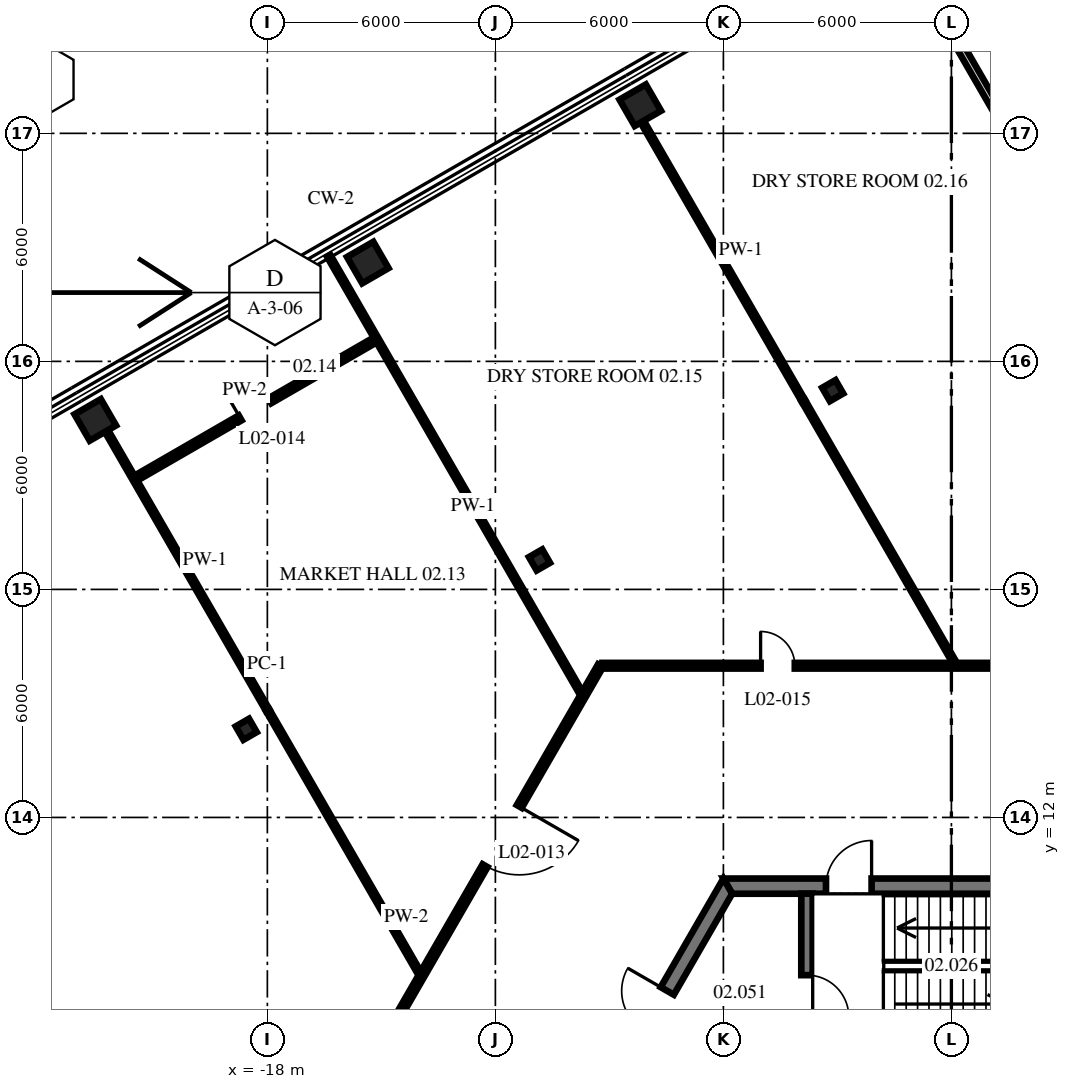
"""IFC4 building model, lengths in metres.
Left out: names, types, materials, properties, quantities, classifications, styles, units other than length and angle.
Written with IfcOpenShell. Run it as: python <this file> out.ifc"""

import sys

from ifc_helpers import new_model, si_unit, direction, frame, frame_2d, origin, origin_2d, place, context, subcontext, project, spatial, polyline, rectangle, i_section, outline, extrude, source, transform, mapped, element, fill, save


model = new_model("IFC4")
c1 = context("Model", 3, precision=1e-05, world=origin(), true_north=direction((0.0, 1.0)))
c2 = subcontext(c1, "Body", "Model", "MODEL_VIEW")
j1 = project(units=[si_unit("LENGTHUNIT", "METRE"), si_unit("PLANEANGLEUNIT", "RADIAN")], contexts=[c1])
p1 = place(None, origin())
s1 = spatial("IfcSite", under=j1, at=p1, CompositionType="ELEMENT")
p2 = place(p1, origin())
s2 = spatial("IfcBuilding", under=s1, at=p2, CompositionType="ELEMENT")
p3 = place(p2, frame((0.0, 0.0, 11.5)))
s3 = spatial("IfcBuildingStorey", under=s2, at=p3, CompositionType="ELEMENT", Elevation=11.5)
m1 = source(origin(), c2, "Body", "SweptSolid", [
    extrude(i_section(OverallWidth=0.404, OverallDepth=0.406, WebThickness=0.027, FlangeThickness=0.044, at=origin_2d()), origin(), (0.0, 0.0, 1.0), 4.5),
])
for number, where, z_axis, x_axis in (
    (1, (-3.124, 23.23, 0.0), (0.0, 0.0, 1.0), (-0.866, -0.5, 0.0)),
    (2, (-10.84, 18.775, 0.0), (0.0, 0.0, 1.0), (-0.866, -0.5, 0.0)),
    (3, (-18.556, 14.32, 0.0), (0.0, 0.0, 1.0), (-0.866, -0.5, 0.0)),
):
    element("IfcColumn", number, at=place(p3, frame(where, z_axis=z_axis, x_axis=x_axis)), inside=s3, PredefinedType="COLUMN", context=c2, shape_type="MappedRepresentation", body=[
        mapped(m1, transform((0.0, 0.0, 0.0), scale=1.0)),
    ])
m2 = source(origin(), c2, "Body", "SweptSolid", [
    extrude(rectangle(XDim=0.8, YDim=0.8, at=origin_2d()), origin(), (0.0, 0.0, 1.0), 4.5),
])
for number, where, z_axis, x_axis in (
    (4, (-8.187, 30.74, 0.0), (0.0, 0.0, 1.0), (-0.866, -0.5, 0.0)),
    (5, (-15.357, 26.6, 0.0), (0.0, 0.0, 1.0), (-0.866, -0.5, 0.0)),
    (6, (-22.528, 22.46, 0.0), (0.0, 0.0, 1.0), (-0.866, -0.5, 0.0)),
):
    element("IfcColumn", number, at=place(p3, frame(where, z_axis=z_axis, x_axis=x_axis)), inside=s3, PredefinedType="COLUMN", context=c2, shape_type="MappedRepresentation", body=[
        mapped(m2, transform((0.0, 0.0, 0.0), scale=1.0)),
    ])
m3 = source(origin(), c2, "Body", "SweptSolid", [
    extrude(outline(polyline([(-0.115, -0.2), (11.885, -0.2), (11.654, 0.2), (0.115, 0.2), (-0.115, -0.2)])), origin(), (0.0, 0.0, 1.0), 4.3),
])
p4 = place(p3, frame((5.885, 10.192, 0.0), z_axis=(0.0, 0.0, 1.0), x_axis=(-1.0, 0.0, 0.0)))
e7 = element("IfcWall", 7, at=p4, inside=s3, PredefinedType="SHEAR", context=c2, shape_type="MappedRepresentation", body=[
    mapped(m3, transform((0.0, 0.0, 0.0), scale=1.0)),
])
p5 = place(p4, frame((7.985, 0.0, 0.0)))
e8 = element("IfcOpeningElement", 8, at=p5, cuts=e7, PredefinedType="OPENING", context=c2, shape_type="SweptSolid", body=[
    extrude(rectangle(XDim=1.2, YDim=2.1, at=frame_2d((0.6, 1.05))), frame((0.0, 0.21, 0.0), z_axis=(0.0, -1.0, 0.0), x_axis=(1.0, 0.0, 0.0)), (0.0, 0.0, 1.0), 0.42),
])
p6 = place(p3, frame((-5.885, 10.192, 0.0), z_axis=(0.0, 0.0, 1.0), x_axis=(-0.499996592174, -0.866027371285, 0.0)))
e9 = element("IfcWall", 9, at=p6, inside=s3, PredefinedType="SHEAR", context=c2, shape_type="MappedRepresentation", body=[
    mapped(m3, transform((0.0, 0.0, 0.0), scale=1.0)),
])
p7 = place(p6, frame((3.185, 0.0, 0.0)))
e10 = element("IfcOpeningElement", 10, at=p7, cuts=e9, PredefinedType="OPENING", context=c2, shape_type="SweptSolid", body=[
    extrude(rectangle(XDim=1.2, YDim=2.1, at=frame_2d((0.6, 1.05))), frame((0.0, 0.21, 0.0), z_axis=(0.0, -1.0, 0.0), x_axis=(1.0, 0.0, 0.0)), (0.0, 0.0, 1.0), 0.42),
])
m4 = source(origin(), c2, "Body", "SweptSolid", [
    extrude(outline(polyline([(0.0, -0.15), (0.0, 0.15), (3.804, 0.15), (3.804, -0.15), (0.0, -0.15)])), origin(), (0.0, 0.0, 1.0), 4.3),
])
p8 = place(p3, frame((-3.8, 6.19, 0.0), z_axis=(0.0, 0.0, 1.0), x_axis=(0.0, 1.0, 0.0)))
e11 = element("IfcWall", 11, at=p8, inside=s3, PredefinedType="SHEAR", context=c2, shape_type="MappedRepresentation", body=[
    mapped(m4, transform((0.0, 0.0, 0.0), scale=1.0)),
])
p9 = place(p8, frame((0.56, 0.0, 0.0)))
e12 = element("IfcOpeningElement", 12, at=p9, cuts=e11, PredefinedType="OPENING", context=c2, shape_type="SweptSolid", body=[
    extrude(rectangle(XDim=1.1, YDim=2.1, at=frame_2d((0.55, 1.05))), frame((0.0, 0.16, 0.0), z_axis=(0.0, -1.0, 0.0), x_axis=(1.0, 0.0, 0.0)), (0.0, 0.0, 1.0), 0.32),
])
m5 = source(origin(), c2, "Body", "SweptSolid", [
    extrude(rectangle(XDim=8.493, YDim=0.1, at=frame_2d((4.247, 0.0))), origin(), (0.0, 0.0, 1.0), 3.528),
])
p10 = place(p3, frame((-22.238, 22.177, 0.0), z_axis=(0.0, 0.0, 1.0), x_axis=(0.500003631449, -0.866023307156, 0.0)))
e13 = element("IfcWall", 13, at=p10, inside=s3, PredefinedType="PARTITIONING", context=c2, shape_type="MappedRepresentation", body=[
    mapped(m5, transform((0.0, 0.0, 0.0), scale=1.0)),
])
m6 = source(origin(), c2, "Body", "SweptSolid", [
    extrude(rectangle(XDim=7.993, YDim=0.1, at=frame_2d((3.996, 0.0))), origin(), (0.0, 0.0, 1.0), 4.3),
])
p11 = place(p3, frame((-17.991, 14.822, 0.0), z_axis=(0.0, 0.0, 1.0), x_axis=(0.499999202028, -0.866025864493, 0.0)))
e14 = element("IfcWall", 14, at=p11, inside=s3, PredefinedType="PARTITIONING", context=c2, shape_type="MappedRepresentation", body=[
    mapped(m6, transform((0.0, 0.0, 0.0), scale=1.0)),
])
p12 = place(p3, frame((-16.384, 26.774, 0.0), z_axis=(0.0, 0.0, 1.0), x_axis=(0.499987033477, -0.86603288988, 0.0)))
e15 = element("IfcWall", 15, at=p12, inside=s3, PredefinedType="PARTITIONING", context=c2, shape_type="SweptSolid", body=[
    extrude(rectangle(XDim=13.286, YDim=0.1, at=frame_2d((6.643, 0.0))), origin(), (0.0, 0.0, 1.0), 4.3),
])
m7 = source(origin(), c2, "Body", "SweptSolid", [
    extrude(rectangle(XDim=8.493, YDim=0.1, at=frame_2d((4.247, 0.0))), origin(), (0.0, 0.0, 1.0), 3.528),
])
p13 = place(p3, frame((-8.141, 30.316, 0.0), z_axis=(0.0, 0.0, 1.0), x_axis=(0.499991184371, -0.86603049343, 0.0)))
e16 = element("IfcWall", 16, at=p13, inside=s3, PredefinedType="PARTITIONING", context=c2, shape_type="MappedRepresentation", body=[
    mapped(m7, transform((0.0, 0.0, 0.0), scale=1.0)),
])
p14 = place(p3, frame((-3.894, 22.961, 0.0), z_axis=(0.0, 0.0, 1.0), x_axis=(0.50001992892, -0.866013897511, 0.0)))
e17 = element("IfcWall", 17, at=p14, inside=s3, PredefinedType="PARTITIONING", context=c2, shape_type="SweptSolid", body=[
    extrude(rectangle(XDim=7.957, YDim=0.1, at=frame_2d((3.979, 0.0))), origin(), (0.0, 0.0, 1.0), 4.3),
])
p15 = place(p3, frame((-1.012, 34.432, 0.0), z_axis=(0.0, 0.0, 1.0), x_axis=(0.499992253202, -0.866029876354, 0.0)))
e18 = element("IfcWall", 18, at=p15, inside=s3, PredefinedType="PARTITIONING", context=c2, shape_type="SweptSolid", body=[
    extrude(rectangle(XDim=19.06, YDim=0.2, at=frame_2d((9.53, 0.0))), origin(), (0.0, 0.0, 1.0), 4.3),
])
p16 = place(p15, frame((9.16, 0.0, 0.0)))
e19 = element("IfcOpeningElement", 19, at=p16, cuts=e18, PredefinedType="OPENING", context=c2, shape_type="SweptSolid", body=[
    extrude(rectangle(XDim=0.9, YDim=2.1, at=frame_2d((0.45, 1.05))), frame((0.0, 0.11, 0.0), z_axis=(0.0, -1.0, 0.0), x_axis=(1.0, 0.0, 0.0)), (0.0, 0.0, 1.0), 0.22),
])
p17 = place(p3, frame((-9.183, 15.992, 0.0), z_axis=(0.0, 0.0, 1.0), x_axis=(1.0, 0.0, 0.0)))
e20 = element("IfcWall", 20, at=p17, inside=s3, PredefinedType="PARTITIONING", context=c2, shape_type="SweptSolid", body=[
    extrude(rectangle(XDim=18.415, YDim=0.15, at=frame_2d((9.207, 0.0))), origin(), (0.0, 0.0, 1.0), 4.3),
])
p18 = place(p17, frame((4.162, 0.0, 0.0)))
e21 = element("IfcOpeningElement", 21, at=p18, cuts=e20, PredefinedType="OPENING", context=c2, shape_type="SweptSolid", body=[
    extrude(rectangle(XDim=0.9, YDim=2.1, at=frame_2d((0.45, 1.05))), frame((0.0, 0.085, 0.0), z_axis=(0.0, -1.0, 0.0), x_axis=(1.0, 0.0, 0.0)), (0.0, 0.0, 1.0), 0.17),
])
p19 = place(p17, frame((13.466, 0.0, 0.0)))
e22 = element("IfcOpeningElement", 22, at=p19, cuts=e20, PredefinedType="OPENING", context=c2, shape_type="SweptSolid", body=[
    extrude(rectangle(XDim=0.9, YDim=2.1, at=frame_2d((0.45, 1.05))), frame((0.0, 0.085, 0.0), z_axis=(0.0, -1.0, 0.0), x_axis=(1.0, 0.0, 0.0)), (0.0, 0.0, 1.0), 0.17),
])
m8 = source(origin(), c2, "Body", "SweptSolid", [
    extrude(rectangle(XDim=7.308, YDim=0.15, at=frame_2d((3.654, 0.0))), origin(), (0.0, 0.0, 1.0), 4.3),
])
p20 = place(p3, frame((-21.477, 20.918, 0.0), z_axis=(0.0, 0.0, 1.0), x_axis=(0.866020355572, 0.500008743658, 0.0)))
e23 = element("IfcWall", 23, at=p20, inside=s3, PredefinedType="PARTITIONING", context=c2, shape_type="MappedRepresentation", body=[
    mapped(m8, transform((0.0, 0.0, 0.0), scale=1.0)),
])
p21 = place(p20, frame((3.188, 0.0, 0.0)))
e24 = element("IfcOpeningElement", 24, at=p21, cuts=e23, PredefinedType="OPENING", context=c2, shape_type="SweptSolid", body=[
    extrude(rectangle(XDim=0.9, YDim=2.1, at=frame_2d((0.45, 1.05))), frame((0.0, 0.085, 0.0), z_axis=(0.0, -1.0, 0.0), x_axis=(1.0, 0.0, 0.0)), (0.0, 0.0, 1.0), 0.17),
])
p22 = place(p3, frame((-18.466, -0.0, 0.0), z_axis=(0.0, 0.0, 1.0), x_axis=(0.499989475653, 0.866031479934, 0.0)))
e25 = element("IfcWall", 25, at=p22, inside=s3, PredefinedType="PARTITIONING", context=c2, shape_type="SweptSolid", body=[
    extrude(rectangle(XDim=18.467, YDim=0.15, at=frame_2d((9.234, 0.0))), origin(), (0.0, 0.0, 1.0), 4.3),
])
p23 = place(p22, frame((12.391, 0.0, 0.0)))
e26 = element("IfcOpeningElement", 26, at=p23, cuts=e25, PredefinedType="OPENING", context=c2, shape_type="SweptSolid", body=[
    extrude(rectangle(XDim=1.8, YDim=2.4, at=frame_2d((0.9, 1.2))), frame((0.0, 0.085, 0.0), z_axis=(0.0, -1.0, 0.0), x_axis=(1.0, 0.0, 0.0)), (0.0, 0.0, 1.0), 0.17),
])
p24 = place(p22, frame((4.083, 0.0, 0.0)))
e27 = element("IfcOpeningElement", 27, at=p24, cuts=e25, PredefinedType="OPENING", context=c2, shape_type="SweptSolid", body=[
    extrude(rectangle(XDim=0.9, YDim=2.1, at=frame_2d((0.45, 1.05))), frame((0.0, 0.085, 0.0), z_axis=(0.0, -1.0, 0.0), x_axis=(1.0, 0.0, 0.0)), (0.0, 0.0, 1.0), 0.17),
])
p25 = place(p5, frame((1.2, 0.0, 0.0), z_axis=(0.0, 0.0, 1.0), x_axis=(-1.0, 0.0, 0.0)))
e28 = element("IfcDoor", 28, at=p25, inside=s3, OperationType="SINGLE_SWING_RIGHT", PredefinedType="DOOR", context=c2, shape_type="SweptSolid", body=[
    extrude(rectangle(XDim=1.2, YDim=2.1, at=frame_2d((0.6, 1.05))), frame((0.0, 0.025, 0.0), z_axis=(0.0, -1.0, 0.0), x_axis=(1.0, 0.0, 0.0)), (0.0, 0.0, 1.0), 0.05),
])
fill(e8, e28)
p26 = place(p7, frame((1.2, 0.0, 0.0), z_axis=(0.0, 0.0, 1.0), x_axis=(-1.0, 0.0, 0.0)))
e29 = element("IfcDoor", 29, at=p26, inside=s3, OperationType="SINGLE_SWING_RIGHT", PredefinedType="DOOR", context=c2, shape_type="SweptSolid", body=[
    extrude(rectangle(XDim=1.2, YDim=2.1, at=frame_2d((0.6, 1.05))), frame((0.0, 0.025, 0.0), z_axis=(0.0, -1.0, 0.0), x_axis=(1.0, 0.0, 0.0)), (0.0, 0.0, 1.0), 0.05),
])
fill(e10, e29)
p27 = place(p9, frame((1.1, 0.0, 0.0), z_axis=(0.0, 0.0, 1.0), x_axis=(-1.0, 0.0, 0.0)))
e30 = element("IfcDoor", 30, at=p27, inside=s3, OperationType="SINGLE_SWING_RIGHT", PredefinedType="DOOR", context=c2, shape_type="SweptSolid", body=[
    extrude(rectangle(XDim=1.1, YDim=2.1, at=frame_2d((0.55, 1.05))), frame((0.0, 0.025, 0.0), z_axis=(0.0, -1.0, 0.0), x_axis=(1.0, 0.0, 0.0)), (0.0, 0.0, 1.0), 0.05),
])
fill(e12, e30)
p28 = place(p23, origin())
e31 = element("IfcDoor", 31, at=p28, inside=s3, OperationType="DOUBLE_DOOR_SINGLE_SWING", PredefinedType="DOOR", context=c2, shape_type="SweptSolid", body=[
    extrude(rectangle(XDim=1.8, YDim=2.4, at=frame_2d((0.9, 1.2))), frame((0.0, 0.025, 0.0), z_axis=(0.0, -1.0, 0.0), x_axis=(1.0, 0.0, 0.0)), (0.0, 0.0, 1.0), 0.05),
])
fill(e26, e31)
p29 = place(p21, origin())
e32 = element("IfcDoor", 32, at=p29, inside=s3, OperationType="SINGLE_SWING_LEFT", PredefinedType="DOOR", context=c2, shape_type="SweptSolid", body=[
    extrude(rectangle(XDim=0.9, YDim=2.1, at=frame_2d((0.45, 1.05))), frame((0.0, 0.025, 0.0), z_axis=(0.0, -1.0, 0.0), x_axis=(1.0, 0.0, 0.0)), (0.0, 0.0, 1.0), 0.05),
])
fill(e24, e32)
p30 = place(p18, origin())
e33 = element("IfcDoor", 33, at=p30, inside=s3, OperationType="SINGLE_SWING_LEFT", PredefinedType="DOOR", context=c2, shape_type="SweptSolid", body=[
    extrude(rectangle(XDim=0.9, YDim=2.1, at=frame_2d((0.45, 1.05))), frame((0.0, 0.025, 0.0), z_axis=(0.0, -1.0, 0.0), x_axis=(1.0, 0.0, 0.0)), (0.0, 0.0, 1.0), 0.05),
])
fill(e21, e33)
save(model, sys.argv[1])
